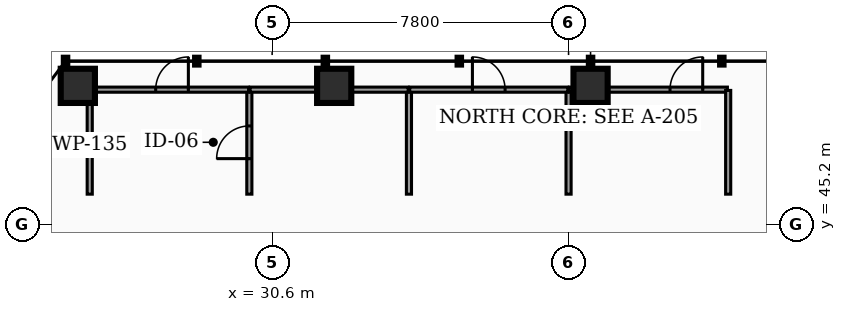
"""IFC4 building model, lengths in metres.
Left out: names, types, materials, properties, quantities, classifications, styles, units other than length and angle.
Written with IfcOpenShell. Run it as: python <this file> out.ifc"""

import sys

from ifc_helpers import new_model, si_unit, direction, frame, frame_2d, origin, origin_2d, place, context, subcontext, project, spatial, rectangle, hollow_rectangle, extrude, element, fill, save


model = new_model("IFC4")
c1 = context("Model", 3, precision=1e-05, world=origin(), true_north=direction((0.0, 1.0)))
c2 = subcontext(c1, "Body", "Model", "MODEL_VIEW")
j1 = project(units=[si_unit("LENGTHUNIT", "METRE"), si_unit("PLANEANGLEUNIT", "RADIAN")], contexts=[c1])
p1 = place(None, origin())
s1 = spatial("IfcSite", under=j1, at=p1, CompositionType="ELEMENT")
p2 = place(p1, origin())
s2 = spatial("IfcBuilding", under=s1, at=p2, CompositionType="ELEMENT")
p3 = place(p2, frame((0.0, 0.0, 100.98)))
s3 = spatial("IfcBuildingStorey", under=s2, at=p3, CompositionType="ELEMENT", Elevation=100.98)
for number, where, z_axis, x_axis in (
    (1, (38.979, 48.85, 0.0), (0.0, 0.0, 1.0), (1.0, 0.0, 0.0)),
    (2, (32.233, 48.85, 0.0), (0.0, 0.0, 1.0), (1.0, 0.0, 0.0)),
    (3, (25.487, 48.85, 0.0), (0.0, 0.0, 1.0), (1.0, 0.0, 0.0)),
):
    element("IfcColumn", number, at=place(p3, frame(where, z_axis=z_axis, x_axis=x_axis)), inside=s3, PredefinedType="COLUMN", context=c2, shape_type="SweptSolid", body=[
        extrude(hollow_rectangle(XDim=0.9, YDim=0.9, WallThickness=0.045, at=origin_2d()), origin(), (0.0, 0.0, 1.0), 3.82),
    ])
p4 = place(p3, frame((30.0, 46.0, 0.0), z_axis=(0.0, 0.0, 1.0), x_axis=(0.0, 1.0, 0.0)))
e4 = element("IfcWall", 4, at=p4, inside=s3, PredefinedType="PARTITIONING", context=c2, shape_type="SweptSolid", body=[
    extrude(rectangle(XDim=2.73, YDim=0.135, at=frame_2d((1.365, 0.0))), origin(), (0.0, 0.0, 1.0), 2.777),
])
p5 = place(p4, frame((0.935, 0.0, 0.0)))
e5 = element("IfcOpeningElement", 5, at=p5, cuts=e4, PredefinedType="OPENING", context=c2, shape_type="SweptSolid", body=[
    extrude(rectangle(XDim=0.86, YDim=2.05, at=frame_2d((0.43, 1.025))), frame((0.0, 0.077, 0.0), z_axis=(0.0, -1.0, 0.0), x_axis=(1.0, 0.0, 0.0)), (0.0, 0.0, 1.0), 0.155),
])
p6 = place(p3, frame((25.951, 48.75, 0.0), z_axis=(0.0, 0.0, 1.0), x_axis=(1.0, 0.0, 0.0)))
e6 = element("IfcWall", 6, at=p6, inside=s3, PredefinedType="PARTITIONING", context=c2, shape_type="SweptSolid", body=[
    extrude(rectangle(XDim=4.029, YDim=0.135, at=frame_2d((2.015, 0.0))), origin(), (0.0, 0.0, 1.0), 2.777),
])
p7 = place(p6, frame((1.584, 0.0, 0.0)))
e7 = element("IfcOpeningElement", 7, at=p7, cuts=e6, PredefinedType="OPENING", context=c2, shape_type="SweptSolid", body=[
    extrude(rectangle(XDim=0.86, YDim=2.05, at=frame_2d((0.43, 1.025))), frame((0.0, 0.077, 0.0), z_axis=(0.0, -1.0, 0.0), x_axis=(1.0, 0.0, 0.0)), (0.0, 0.0, 1.0), 0.155),
])
p8 = place(p3, frame((25.8, 46.0, 0.0), z_axis=(0.0, 0.0, 1.0), x_axis=(0.0, 1.0, 0.0)))
e8 = element("IfcWall", 8, at=p8, inside=s3, PredefinedType="PARTITIONING", context=c2, shape_type="SweptSolid", body=[
    extrude(rectangle(XDim=2.599, YDim=0.135, at=frame_2d((1.3, 0.0))), origin(), (0.0, 0.0, 1.0), 2.777),
])
p9 = place(p3, frame((34.2, 46.0, 0.0), z_axis=(0.0, 0.0, 1.0), x_axis=(0.0, 1.0, 0.0)))
e9 = element("IfcWall", 9, at=p9, inside=s3, PredefinedType="PARTITIONING", context=c2, shape_type="SweptSolid", body=[
    extrude(rectangle(XDim=2.73, YDim=0.135, at=frame_2d((1.365, 0.0))), origin(), (0.0, 0.0, 1.0), 2.777),
])
p10 = place(p3, frame((30.02, 48.75, 0.0), z_axis=(0.0, 0.0, 1.0), x_axis=(1.0, 0.0, 0.0)))
e10 = element("IfcWall", 10, at=p10, inside=s3, PredefinedType="PARTITIONING", context=c2, shape_type="SweptSolid", body=[
    extrude(rectangle(XDim=1.755, YDim=0.135, at=frame_2d((0.877, 0.0))), origin(), (0.0, 0.0, 1.0), 2.777),
])
p11 = place(p3, frame((32.198, 48.75, 0.0), z_axis=(0.0, 0.0, 1.0), x_axis=(1.0, 0.0, 0.0)))
e11 = element("IfcWall", 11, at=p11, inside=s3, PredefinedType="PARTITIONING", context=c2, shape_type="SweptSolid", body=[
    extrude(rectangle(XDim=1.982, YDim=0.135, at=frame_2d((0.991, 0.0))), origin(), (0.0, 0.0, 1.0), 2.777),
])
p12 = place(p3, frame((38.4, 46.0, 0.0), z_axis=(0.0, 0.0, 1.0), x_axis=(0.0, 1.0, 0.0)))
e12 = element("IfcWall", 12, at=p12, inside=s3, PredefinedType="PARTITIONING", context=c2, shape_type="SweptSolid", body=[
    extrude(rectangle(XDim=2.73, YDim=0.135, at=frame_2d((1.365, 0.0))), origin(), (0.0, 0.0, 1.0), 2.777),
])
p13 = place(p3, frame((34.22, 48.75, 0.0), z_axis=(0.0, 0.0, 1.0), x_axis=(1.0, 0.0, 0.0)))
e13 = element("IfcWall", 13, at=p13, inside=s3, PredefinedType="PARTITIONING", context=c2, shape_type="SweptSolid", body=[
    extrude(rectangle(XDim=4.16, YDim=0.135, at=frame_2d((2.08, 0.0))), origin(), (0.0, 0.0, 1.0), 2.777),
])
p14 = place(p13, frame((1.65, 0.0, 0.0)))
e14 = element("IfcOpeningElement", 14, at=p14, cuts=e13, PredefinedType="OPENING", context=c2, shape_type="SweptSolid", body=[
    extrude(rectangle(XDim=0.86, YDim=2.05, at=frame_2d((0.43, 1.025))), frame((0.0, 0.077, 0.0), z_axis=(0.0, -1.0, 0.0), x_axis=(1.0, 0.0, 0.0)), (0.0, 0.0, 1.0), 0.155),
])
p15 = place(p3, frame((38.42, 48.75, 0.0), z_axis=(0.0, 0.0, 1.0), x_axis=(1.0, 0.0, 0.0)))
e15 = element("IfcWall", 15, at=p15, inside=s3, PredefinedType="PARTITIONING", context=c2, shape_type="SweptSolid", body=[
    extrude(rectangle(XDim=4.16, YDim=0.135, at=frame_2d((2.08, 0.0))), origin(), (0.0, 0.0, 1.0), 2.777),
])
p16 = place(p15, frame((2.65, 0.0, 0.0)))
e16 = element("IfcOpeningElement", 16, at=p16, cuts=e15, PredefinedType="OPENING", context=c2, shape_type="SweptSolid", body=[
    extrude(rectangle(XDim=0.86, YDim=2.05, at=frame_2d((0.43, 1.025))), frame((0.0, 0.077, 0.0), z_axis=(0.0, -1.0, 0.0), x_axis=(1.0, 0.0, 0.0)), (0.0, 0.0, 1.0), 0.155),
])
p17 = place(p3, frame((42.6, 46.0, 0.0), z_axis=(0.0, 0.0, 1.0), x_axis=(0.0, 1.0, 0.0)))
e17 = element("IfcWall", 17, at=p17, inside=s3, PredefinedType="PARTITIONING", context=c2, shape_type="SweptSolid", body=[
    extrude(rectangle(XDim=2.73, YDim=0.135, at=frame_2d((1.365, 0.0))), origin(), (0.0, 0.0, 1.0), 2.777),
])
p18 = place(p3, frame((32.0, 48.977, 0.0), z_axis=(0.0, 0.0, 1.0), x_axis=(0.0, 1.0, 0.0)))
e18 = element("IfcWall", 18, at=p18, inside=s3, PredefinedType="PARTITIONING", context=c2, shape_type="SweptSolid", body=[
    extrude(rectangle(XDim=0.509, YDim=0.12, at=frame_2d((0.254, 0.0))), origin(), (0.0, 0.0, 1.0), 2.777),
])
p19 = place(p5, origin())
e19 = element("IfcDoor", 19, at=p19, inside=s3, OperationType="SINGLE_SWING_LEFT", PredefinedType="DOOR", context=c2, shape_type="SweptSolid", body=[
    extrude(rectangle(XDim=0.86, YDim=2.05, at=frame_2d((0.43, 1.025))), frame((0.0, 0.025, 0.0), z_axis=(0.0, -1.0, 0.0), x_axis=(1.0, 0.0, 0.0)), (0.0, 0.0, 1.0), 0.05),
])
fill(e5, e19)
p20 = place(p7, origin())
e20 = element("IfcDoor", 20, at=p20, inside=s3, OperationType="SINGLE_SWING_RIGHT", PredefinedType="DOOR", context=c2, shape_type="SweptSolid", body=[
    extrude(rectangle(XDim=0.86, YDim=2.05, at=frame_2d((0.43, 1.025))), frame((0.0, 0.025, 0.0), z_axis=(0.0, -1.0, 0.0), x_axis=(1.0, 0.0, 0.0)), (0.0, 0.0, 1.0), 0.05),
])
fill(e7, e20)
p21 = place(p14, origin())
e21 = element("IfcDoor", 21, at=p21, inside=s3, OperationType="SINGLE_SWING_LEFT", PredefinedType="DOOR", context=c2, shape_type="SweptSolid", body=[
    extrude(rectangle(XDim=0.86, YDim=2.05, at=frame_2d((0.43, 1.025))), frame((0.0, 0.025, 0.0), z_axis=(0.0, -1.0, 0.0), x_axis=(1.0, 0.0, 0.0)), (0.0, 0.0, 1.0), 0.05),
])
fill(e14, e21)
p22 = place(p16, origin())
e22 = element("IfcDoor", 22, at=p22, inside=s3, OperationType="SINGLE_SWING_RIGHT", PredefinedType="DOOR", context=c2, shape_type="SweptSolid", body=[
    extrude(rectangle(XDim=0.86, YDim=2.05, at=frame_2d((0.43, 1.025))), frame((0.0, 0.025, 0.0), z_axis=(0.0, -1.0, 0.0), x_axis=(1.0, 0.0, 0.0)), (0.0, 0.0, 1.0), 0.05),
])
fill(e16, e22)
save(model, sys.argv[1])
